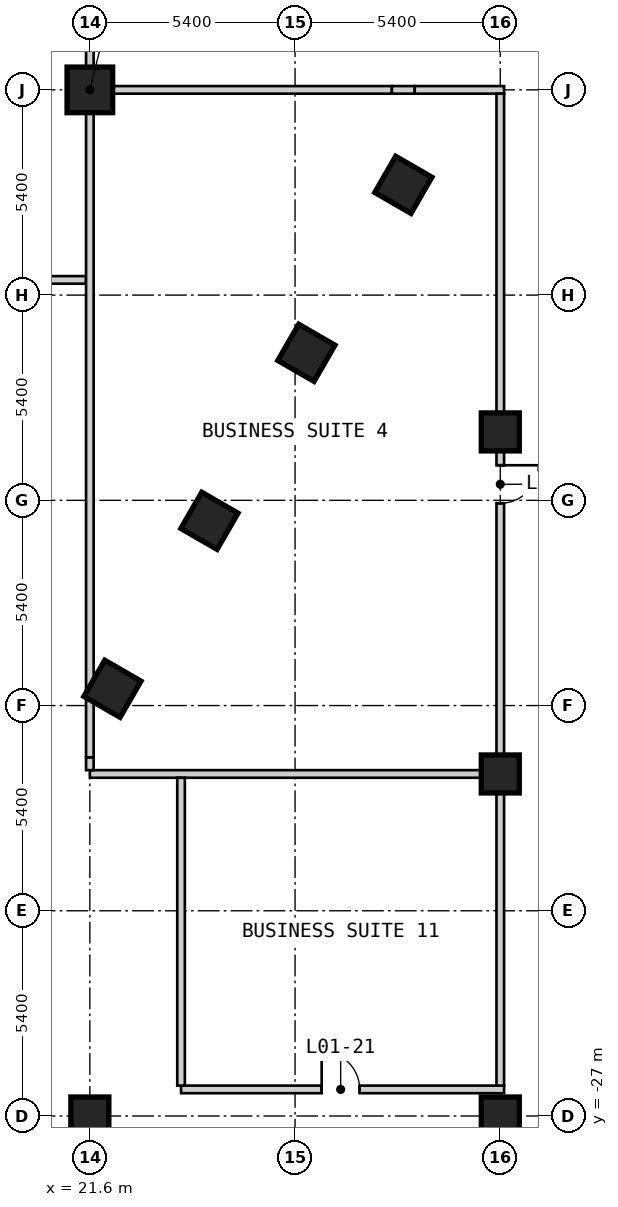
"""IFC4 building model, lengths in metres.
Left out: names, types, materials, properties, quantities, classifications, styles, units other than length and angle.
Written with IfcOpenShell. Run it as: python <this file> out.ifc"""

import sys

from ifc_helpers import new_model, si_unit, direction, frame, frame_2d, origin, origin_2d, place, context, subcontext, project, spatial, rectangle, extrude, element, fill, save


model = new_model("IFC4")
c1 = context("Model", 3, precision=1e-05, world=origin(), true_north=direction((0.0, 1.0)))
c2 = subcontext(c1, "Body", "Model", "MODEL_VIEW")
j1 = project(units=[si_unit("LENGTHUNIT", "METRE"), si_unit("PLANEANGLEUNIT", "RADIAN")], contexts=[c1])
p1 = place(None, origin())
s1 = spatial("IfcSite", under=j1, at=p1, CompositionType="ELEMENT")
p2 = place(p1, origin())
s2 = spatial("IfcBuilding", under=s1, at=p2, CompositionType="ELEMENT")
p3 = place(p2, frame((0.0, 0.0, 5.0)))
s3 = spatial("IfcBuildingStorey", under=s2, at=p3, CompositionType="ELEMENT", Elevation=5.0)
for number, where, z_axis, x_axis in (
    (1, (22.194, -15.759, 0.0), (0.0, 0.0, 1.0), (0.5, 0.866, 0.0)),
    (2, (24.746, -11.339, 0.0), (0.0, 0.0, 1.0), (0.5, 0.866, 0.0)),
    (3, (27.298, -6.919, 0.0), (0.0, 0.0, 1.0), (0.5, 0.866, 0.0)),
    (4, (29.849, -2.499, 0.0), (0.0, 0.0, 1.0), (0.5, 0.866, 0.0)),
):
    element("IfcColumn", number, at=place(p3, frame(where, z_axis=z_axis, x_axis=x_axis)), inside=s3, PredefinedType="COLUMN", context=c2, shape_type="SweptSolid", body=[
        extrude(rectangle(XDim=1.1, YDim=1.1, at=origin_2d()), origin(), (0.0, 0.0, 1.0), 4.0),
    ])
p4 = place(p3, frame((21.6, 0.0, 0.0), z_axis=(0.0, 0.0, 1.0), x_axis=(1.0, 0.0, 0.0)))
e5 = element("IfcColumn", 5, at=p4, inside=s3, PredefinedType="COLUMN", context=c2, shape_type="SweptSolid", body=[
    extrude(rectangle(XDim=1.2, YDim=1.2, at=origin_2d()), origin(), (0.0, 0.0, 1.0), 4.0),
])
for number, where, z_axis, x_axis in (
    (6, (21.6, -27.0, 0.0), (0.0, 0.0, 1.0), (1.0, 0.0, 0.0)),
    (7, (32.4, -27.0, 0.0), (0.0, 0.0, 1.0), (1.0, 0.0, 0.0)),
    (8, (32.4, -18.0, 0.0), (0.0, 0.0, 1.0), (1.0, 0.0, 0.0)),
    (9, (32.4, -9.0, 0.0), (0.0, 0.0, 1.0), (1.0, 0.0, 0.0)),
):
    element("IfcColumn", number, at=place(p3, frame(where, z_axis=z_axis, x_axis=x_axis)), inside=s3, PredefinedType="COLUMN", context=c2, shape_type="SweptSolid", body=[
        extrude(rectangle(XDim=1.0, YDim=1.0, at=origin_2d()), origin(), (0.0, 0.0, 1.0), 4.0),
    ])
p5 = place(p3, frame((24.0, -26.3, 0.0), z_axis=(0.0, 0.0, 1.0), x_axis=(1.0, 0.0, 0.0)))
e10 = element("IfcWall", 10, at=p5, inside=s3, PredefinedType="PARTITIONING", context=c2, shape_type="SweptSolid", body=[
    extrude(rectangle(XDim=8.5, YDim=0.2, at=frame_2d((4.25, 0.0))), origin(), (0.0, 0.0, 1.0), 3.5),
])
p6 = place(p5, frame((3.7, 0.0, 0.0)))
e11 = element("IfcOpeningElement", 11, at=p6, cuts=e10, PredefinedType="OPENING", context=c2, shape_type="SweptSolid", body=[
    extrude(rectangle(XDim=1.0, YDim=2.1, at=frame_2d((0.5, 1.05))), frame((0.0, 0.11, 0.0), z_axis=(0.0, -1.0, 0.0), x_axis=(1.0, 0.0, 0.0)), (0.0, 0.0, 1.0), 0.22),
])
p7 = place(p3, frame((21.6, -18.0, 0.0), z_axis=(0.0, 0.0, 1.0), x_axis=(1.0, 0.0, 0.0)))
e12 = element("IfcWall", 12, at=p7, inside=s3, PredefinedType="PARTITIONING", context=c2, shape_type="SweptSolid", body=[
    extrude(rectangle(XDim=10.8, YDim=0.2, at=frame_2d((5.4, 0.0))), origin(), (0.0, 0.0, 1.0), 3.5),
])
p8 = place(p3, frame((13.42, -5.0, 0.0), z_axis=(0.0, 0.0, 1.0), x_axis=(1.0, 0.0, 0.0)))
e13 = element("IfcWall", 13, at=p8, inside=s3, PredefinedType="PARTITIONING", context=c2, shape_type="SweptSolid", body=[
    extrude(rectangle(XDim=8.08, YDim=0.2, at=frame_2d((4.04, 0.0))), origin(), (0.0, 0.0, 1.0), 3.5),
])
p9 = place(p3, frame((21.7, 0.0, 0.0), z_axis=(0.0, 0.0, 1.0), x_axis=(1.0, 0.0, 0.0)))
e14 = element("IfcWall", 14, at=p9, inside=s3, PredefinedType="PARTITIONING", context=c2, shape_type="SweptSolid", body=[
    extrude(rectangle(XDim=7.848, YDim=0.2, at=frame_2d((3.924, 0.0))), origin(), (0.0, 0.0, 1.0), 3.5),
])
p10 = place(p3, frame((29.548, 0.0, 0.0), z_axis=(0.0, 0.0, 1.0), x_axis=(1.0, 0.0, 0.0)))
e15 = element("IfcWall", 15, at=p10, inside=s3, PredefinedType="PARTITIONING", context=c2, shape_type="SweptSolid", body=[
    extrude(rectangle(XDim=0.601, YDim=0.2, at=frame_2d((0.3, 0.0))), origin(), (0.0, 0.0, 1.0), 2.77),
])
p11 = place(p3, frame((30.149, 0.0, 0.0), z_axis=(0.0, 0.0, 1.0), x_axis=(1.0, 0.0, 0.0)))
e16 = element("IfcWall", 16, at=p11, inside=s3, PredefinedType="PARTITIONING", context=c2, shape_type="SweptSolid", body=[
    extrude(rectangle(XDim=2.351, YDim=0.2, at=frame_2d((1.176, 0.0))), origin(), (0.0, 0.0, 1.0), 3.5),
])
p12 = place(p3, frame((21.6, -17.9, 0.0), z_axis=(0.0, 0.0, 1.0), x_axis=(0.0, 1.0, 0.0)))
e17 = element("IfcWall", 17, at=p12, inside=s3, PredefinedType="PARTITIONING", context=c2, shape_type="SweptSolid", body=[
    extrude(rectangle(XDim=0.339, YDim=0.2, at=frame_2d((0.169, 0.0))), origin(), (0.0, 0.0, 1.0), 3.5),
])
p13 = place(p3, frame((21.6, -17.561, 0.0), z_axis=(0.0, 0.0, 1.0), x_axis=(0.0, 1.0, 0.0)))
e18 = element("IfcWall", 18, at=p13, inside=s3, PredefinedType="PARTITIONING", context=c2, shape_type="SweptSolid", body=[
    extrude(rectangle(XDim=1.546, YDim=0.2, at=frame_2d((0.773, 0.0))), origin(), (0.0, 0.0, 1.0), 2.77),
])
p14 = place(p3, frame((21.6, -16.015, 0.0), z_axis=(0.0, 0.0, 1.0), x_axis=(0.0, 1.0, 0.0)))
e19 = element("IfcWall", 19, at=p14, inside=s3, PredefinedType="PARTITIONING", context=c2, shape_type="SweptSolid", body=[
    extrude(rectangle(XDim=32.03, YDim=0.2, at=frame_2d((16.015, 0.0))), origin(), (0.0, 0.0, 1.0), 3.5),
])
p15 = place(p3, frame((24.0, -26.2, 0.0), z_axis=(0.0, 0.0, 1.0), x_axis=(0.0, 1.0, 0.0)))
e20 = element("IfcWall", 20, at=p15, inside=s3, PredefinedType="PARTITIONING", context=c2, shape_type="SweptSolid", body=[
    extrude(rectangle(XDim=8.1, YDim=0.2, at=frame_2d((4.05, 0.0))), origin(), (0.0, 0.0, 1.0), 3.5),
])
p16 = place(p3, frame((32.4, -26.2, 0.0), z_axis=(0.0, 0.0, 1.0), x_axis=(0.0, 1.0, 0.0)))
e21 = element("IfcWall", 21, at=p16, inside=s3, PredefinedType="PARTITIONING", context=c2, shape_type="SweptSolid", body=[
    extrude(rectangle(XDim=26.1, YDim=0.2, at=frame_2d((13.05, 0.0))), origin(), (0.0, 0.0, 1.0), 3.5),
])
p17 = place(p16, frame((15.323, 0.0, 0.0)))
e22 = element("IfcOpeningElement", 22, at=p17, cuts=e21, PredefinedType="OPENING", context=c2, shape_type="SweptSolid", body=[
    extrude(rectangle(XDim=1.0, YDim=2.1, at=frame_2d((0.5, 1.05))), frame((0.0, 0.11, 0.0), z_axis=(0.0, -1.0, 0.0), x_axis=(1.0, 0.0, 0.0)), (0.0, 0.0, 1.0), 0.22),
])
p18 = place(p17, origin())
e23 = element("IfcDoor", 23, at=p18, inside=s3, OperationType="SINGLE_SWING_RIGHT", PredefinedType="DOOR", context=c2, shape_type="SweptSolid", body=[
    extrude(rectangle(XDim=1.0, YDim=2.1, at=frame_2d((0.5, 1.05))), frame((0.0, 0.025, 0.0), z_axis=(0.0, -1.0, 0.0), x_axis=(1.0, 0.0, 0.0)), (0.0, 0.0, 1.0), 0.05),
])
fill(e22, e23)
p19 = place(p6, origin())
e24 = element("IfcDoor", 24, at=p19, inside=s3, OperationType="SINGLE_SWING_LEFT", PredefinedType="DOOR", context=c2, shape_type="SweptSolid", body=[
    extrude(rectangle(XDim=1.0, YDim=2.1, at=frame_2d((0.5, 1.05))), frame((0.0, 0.025, 0.0), z_axis=(0.0, -1.0, 0.0), x_axis=(1.0, 0.0, 0.0)), (0.0, 0.0, 1.0), 0.05),
])
fill(e11, e24)
save(model, sys.argv[1])
